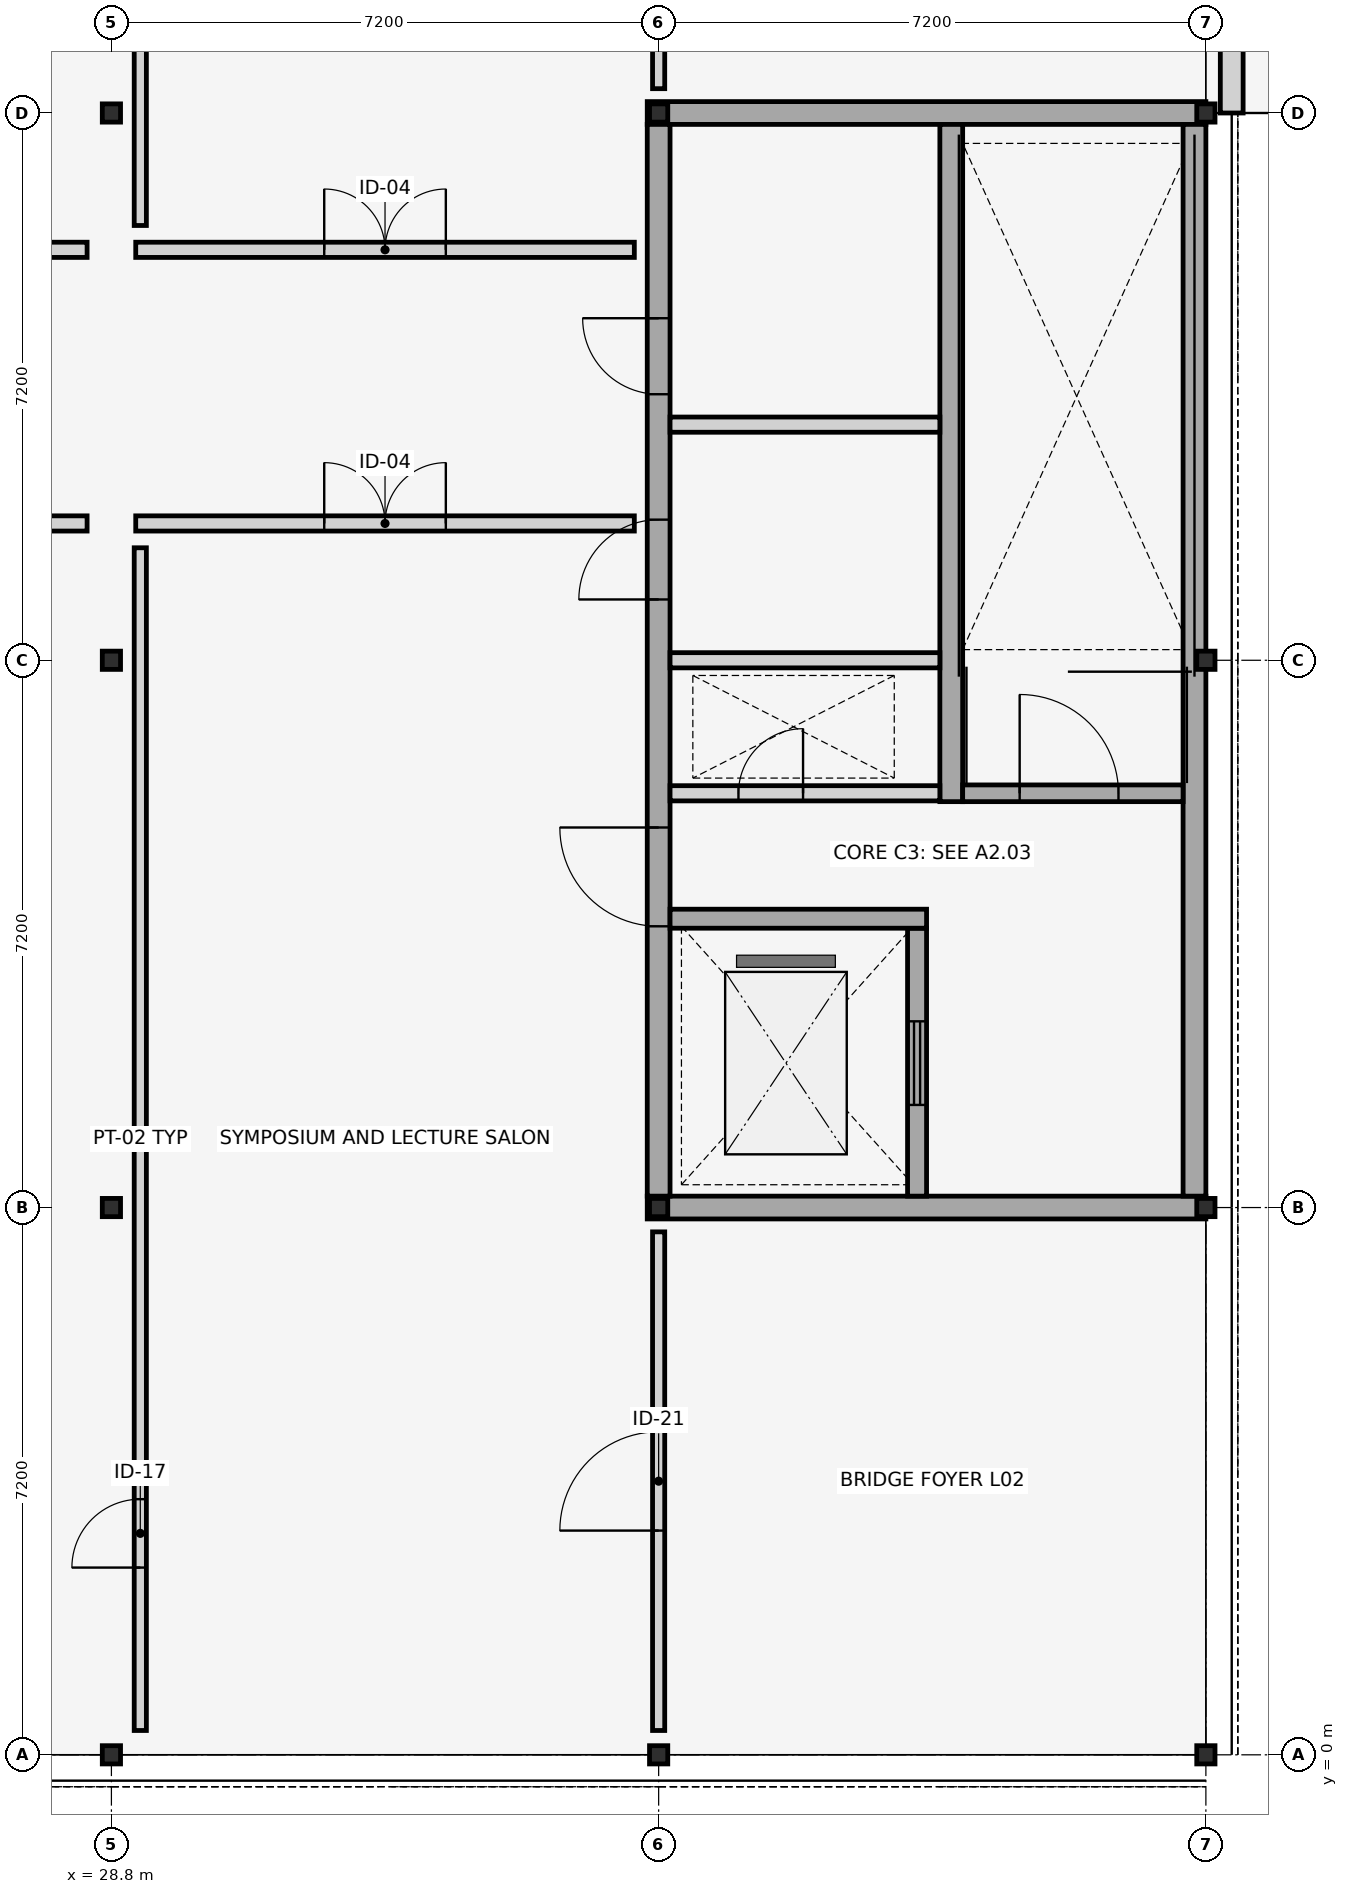
"""IFC4 building model, lengths in metres.
Left out: names, types, materials, properties, quantities, classifications, styles, units other than length and angle.
Written with IfcOpenShell. Run it as: python <this file> out.ifc"""

import sys

from ifc_helpers import new_model, si_unit, direction, frame, frame_2d, origin, origin_2d, place, context, subcontext, project, spatial, rectangle, i_section, extrude, element, fill, save


model = new_model("IFC4")
c1 = context("Model", 3, precision=1e-05, world=origin(), true_north=direction((0.0, 1.0)))
c2 = subcontext(c1, "Body", "Model", "MODEL_VIEW")
j1 = project(units=[si_unit("LENGTHUNIT", "METRE"), si_unit("PLANEANGLEUNIT", "RADIAN")], contexts=[c1])
p1 = place(None, origin())
s1 = spatial("IfcSite", under=j1, at=p1, CompositionType="ELEMENT")
p2 = place(p1, origin())
s2 = spatial("IfcBuilding", under=s1, at=p2, CompositionType="ELEMENT")
p3 = place(p2, frame((0.0, 0.0, 8.7)))
s3 = spatial("IfcBuildingStorey", under=s2, at=p3, CompositionType="ELEMENT", Elevation=8.7)
for number, where, z_axis, x_axis in (
    (1, (28.8, 0.0, 0.0), (0.0, 0.0, 1.0), (1.0, 0.0, 0.0)),
    (2, (28.8, 7.2, 0.0), (0.0, 0.0, 1.0), (0.0, 1.0, 0.0)),
    (3, (28.8, 14.4, 0.0), (0.0, 0.0, 1.0), (1.0, 0.0, 0.0)),
    (4, (28.8, 21.6, 0.0), (0.0, 0.0, 1.0), (0.0, 1.0, 0.0)),
    (5, (36.0, 0.0, 0.0), (0.0, 0.0, 1.0), (0.0, 1.0, 0.0)),
    (6, (36.0, 7.2, 0.0), (0.0, 0.0, 1.0), (1.0, 0.0, 0.0)),
    (7, (36.0, 21.6, 0.0), (0.0, 0.0, 1.0), (1.0, 0.0, 0.0)),
    (8, (43.2, 0.0, 0.0), (0.0, 0.0, 1.0), (1.0, 0.0, 0.0)),
    (9, (43.2, 7.2, 0.0), (0.0, 0.0, 1.0), (0.0, 1.0, 0.0)),
    (10, (43.2, 14.4, 0.0), (0.0, 0.0, 1.0), (1.0, 0.0, 0.0)),
    (11, (43.2, 21.6, 0.0), (0.0, 0.0, 1.0), (0.0, 1.0, 0.0)),
):
    element("IfcColumn", number, at=place(p3, frame(where, z_axis=z_axis, x_axis=x_axis)), inside=s3, PredefinedType="COLUMN", context=c2, shape_type="SweptSolid", body=[
        extrude(i_section(OverallWidth=0.24, OverallDepth=0.24, WebThickness=0.01, FlangeThickness=0.017, FilletRadius=0.021, at=origin_2d()), origin(), (0.0, 0.0, 1.0), 4.2),
    ])
p4 = place(p3, frame((43.54, 21.6, 0.0), z_axis=(0.0, 0.0, 1.0), x_axis=(0.0, 1.0, 0.0)))
e12 = element("IfcWall", 12, at=p4, inside=s3, PredefinedType="STANDARD", context=c2, shape_type="SweptSolid", body=[
    extrude(rectangle(XDim=7.68, YDim=0.3, at=frame_2d((3.84, 0.0))), origin(), (0.0, 0.0, 1.0), 3.65),
])
p5 = place(p4, frame((2.65, 0.0, 0.0)))
e13 = element("IfcOpeningElement", 13, at=p5, cuts=e12, PredefinedType="OPENING", context=c2, shape_type="SweptSolid", body=[
    extrude(rectangle(XDim=1.9, YDim=2.45, at=frame_2d((0.95, 1.225))), frame((0.0, 0.16, 0.0), z_axis=(0.0, -1.0, 0.0), x_axis=(1.0, 0.0, 0.0)), (0.0, 0.0, 1.0), 0.32),
])
for number, where, z_axis, x_axis in (
    (14, (35.85, 7.2, 0.0), (0.0, 0.0, 1.0), (1.0, 0.0, 0.0)),
    (15, (35.85, 21.6, 0.0), (0.0, 0.0, 1.0), (1.0, 0.0, 0.0)),
):
    element("IfcWall", number, at=place(p3, frame(where, z_axis=z_axis, x_axis=x_axis)), inside=s3, PredefinedType="SHEAR", context=c2, shape_type="SweptSolid", body=[
        extrude(rectangle(XDim=7.35, YDim=0.3, at=frame_2d((3.675, 0.0))), origin(), (0.0, 0.0, 1.0), 3.96),
    ])
p6 = place(p3, frame((43.05, 7.35, 0.0), z_axis=(0.0, 0.0, 1.0), x_axis=(0.0, 1.0, 0.0)))
e16 = element("IfcWall", 16, at=p6, inside=s3, PredefinedType="SHEAR", context=c2, shape_type="SweptSolid", body=[
    extrude(rectangle(XDim=14.1, YDim=0.3, at=frame_2d((7.05, 0.0))), origin(), (0.0, 0.0, 1.0), 3.96),
])
p7 = place(p3, frame((36.0, 7.35, 0.0), z_axis=(0.0, 0.0, 1.0), x_axis=(0.0, 1.0, 0.0)))
e17 = element("IfcWall", 17, at=p7, inside=s3, PredefinedType="SHEAR", context=c2, shape_type="SweptSolid", body=[
    extrude(rectangle(XDim=14.1, YDim=0.3, at=frame_2d((7.05, 0.0))), origin(), (0.0, 0.0, 1.0), 3.96),
])
p8 = place(p7, frame((3.55, 0.0, 0.0)))
e18 = element("IfcOpeningElement", 18, at=p8, cuts=e17, PredefinedType="OPENING", context=c2, shape_type="SweptSolid", body=[
    extrude(rectangle(XDim=1.3, YDim=2.2, at=frame_2d((0.65, 1.1))), frame((0.0, 0.16, 0.0), z_axis=(0.0, -1.0, 0.0), x_axis=(1.0, 0.0, 0.0)), (0.0, 0.0, 1.0), 0.32),
])
p9 = place(p7, frame((7.85, 0.0, 0.0)))
e19 = element("IfcOpeningElement", 19, at=p9, cuts=e17, PredefinedType="OPENING", context=c2, shape_type="SweptSolid", body=[
    extrude(rectangle(XDim=1.05, YDim=2.15, at=frame_2d((0.525, 1.075))), frame((0.0, 0.16, 0.0), z_axis=(0.0, -1.0, 0.0), x_axis=(1.0, 0.0, 0.0)), (0.0, 0.0, 1.0), 0.32),
])
p10 = place(p7, frame((10.55, 0.0, 0.0)))
e20 = element("IfcOpeningElement", 20, at=p10, cuts=e17, PredefinedType="OPENING", context=c2, shape_type="SweptSolid", body=[
    extrude(rectangle(XDim=1.0, YDim=2.15, at=frame_2d((0.5, 1.075))), frame((0.0, 0.16, 0.0), z_axis=(0.0, -1.0, 0.0), x_axis=(1.0, 0.0, 0.0)), (0.0, 0.0, 1.0), 0.32),
])
p11 = place(p3, frame((39.4, 7.35, 0.0), z_axis=(0.0, 0.0, 1.0), x_axis=(0.0, 1.0, 0.0)))
e21 = element("IfcWall", 21, at=p11, inside=s3, PredefinedType="SHEAR", context=c2, shape_type="SweptSolid", body=[
    extrude(rectangle(XDim=3.525, YDim=0.25, at=frame_2d((1.762, 0.0))), origin(), (0.0, 0.0, 1.0), 3.96),
])
p12 = place(p11, frame((1.2, 0.0, 0.0)))
e22 = element("IfcOpeningElement", 22, at=p12, cuts=e21, PredefinedType="OPENING", context=c2, shape_type="SweptSolid", body=[
    extrude(rectangle(XDim=1.1, YDim=2.15, at=frame_2d((0.55, 1.075))), frame((0.0, 0.135, 0.0), z_axis=(0.0, -1.0, 0.0), x_axis=(1.0, 0.0, 0.0)), (0.0, 0.0, 1.0), 0.27),
])
p13 = place(p3, frame((39.85, 12.54, 0.0), z_axis=(0.0, 0.0, 1.0), x_axis=(0.0, 1.0, 0.0)))
e23 = element("IfcWall", 23, at=p13, inside=s3, PredefinedType="SHEAR", context=c2, shape_type="SweptSolid", body=[
    extrude(rectangle(XDim=8.91, YDim=0.3, at=frame_2d((4.455, 0.0))), origin(), (0.0, 0.0, 1.0), 3.96),
])
p14 = place(p3, frame((36.15, 12.65, 0.0), z_axis=(0.0, 0.0, 1.0), x_axis=(1.0, 0.0, 0.0)))
e24 = element("IfcWall", 24, at=p14, inside=s3, PredefinedType="PLUMBINGWALL", context=c2, shape_type="SweptSolid", body=[
    extrude(rectangle(XDim=3.55, YDim=0.2, at=frame_2d((1.775, 0.0))), origin(), (0.0, 0.0, 1.0), 3.38),
])
p15 = place(p14, frame((0.9, 0.0, 0.0)))
e25 = element("IfcOpeningElement", 25, at=p15, cuts=e24, PredefinedType="OPENING", context=c2, shape_type="SweptSolid", body=[
    extrude(rectangle(XDim=0.85, YDim=2.05, at=frame_2d((0.425, 1.025))), frame((0.0, 0.11, 0.0), z_axis=(0.0, -1.0, 0.0), x_axis=(1.0, 0.0, 0.0)), (0.0, 0.0, 1.0), 0.22),
])
p16 = place(p3, frame((40.0, 12.65, 0.0), z_axis=(0.0, 0.0, 1.0), x_axis=(1.0, 0.0, 0.0)))
e26 = element("IfcWall", 26, at=p16, inside=s3, PredefinedType="SHEAR", context=c2, shape_type="SweptSolid", body=[
    extrude(rectangle(XDim=2.9, YDim=0.22, at=frame_2d((1.45, 0.0))), origin(), (0.0, 0.0, 1.0), 3.96),
])
p17 = place(p16, frame((0.75, 0.0, 0.0)))
e27 = element("IfcOpeningElement", 27, at=p17, cuts=e26, PredefinedType="OPENING", context=c2, shape_type="SweptSolid", body=[
    extrude(rectangle(XDim=1.3, YDim=2.2, at=frame_2d((0.65, 1.1))), frame((0.0, 0.12, 0.0), z_axis=(0.0, -1.0, 0.0), x_axis=(1.0, 0.0, 0.0)), (0.0, 0.0, 1.0), 0.24),
])
p18 = place(p3, frame((36.15, 11.0, 0.0), z_axis=(0.0, 0.0, 1.0), x_axis=(1.0, 0.0, 0.0)))
e28 = element("IfcWall", 28, at=p18, inside=s3, PredefinedType="SHEAR", context=c2, shape_type="SweptSolid", body=[
    extrude(rectangle(XDim=3.375, YDim=0.25, at=frame_2d((1.688, 0.0))), origin(), (0.0, 0.0, 1.0), 3.96),
])
for number, where, z_axis, x_axis in (
    (29, (36.15, 14.4, 0.0), (0.0, 0.0, 1.0), (1.0, 0.0, 0.0)),
    (30, (36.15, 17.5, 0.0), (0.0, 0.0, 1.0), (1.0, 0.0, 0.0)),
):
    element("IfcWall", number, at=place(p3, frame(where, z_axis=z_axis, x_axis=x_axis)), inside=s3, PredefinedType="PLUMBINGWALL", context=c2, shape_type="SweptSolid", body=[
        extrude(rectangle(XDim=3.55, YDim=0.2, at=frame_2d((1.775, 0.0))), origin(), (0.0, 0.0, 1.0), 3.38),
    ])
p19 = place(p3, frame((7.52, 16.2, 0.0), z_axis=(0.0, 0.0, 1.0), x_axis=(1.0, 0.0, 0.0)))
e31 = element("IfcWall", 31, at=p19, inside=s3, PredefinedType="PARTITIONING", context=c2, shape_type="SweptSolid", body=[
    extrude(rectangle(XDim=20.96, YDim=0.2, at=frame_2d((10.48, 0.0))), origin(), (0.0, 0.0, 1.0), 3.15),
])
p20 = place(p19, frame((9.68, 0.0, 0.0)))
e32 = element("IfcOpeningElement", 32, at=p20, cuts=e31, PredefinedType="OPENING", context=c2, shape_type="SweptSolid", body=[
    extrude(rectangle(XDim=1.6, YDim=2.35, at=frame_2d((0.8, 1.175))), frame((0.0, 0.11, 0.0), z_axis=(0.0, -1.0, 0.0), x_axis=(1.0, 0.0, 0.0)), (0.0, 0.0, 1.0), 0.22),
])
p21 = place(p3, frame((7.52, 19.8, 0.0), z_axis=(0.0, 0.0, 1.0), x_axis=(1.0, 0.0, 0.0)))
e33 = element("IfcWall", 33, at=p21, inside=s3, PredefinedType="PARTITIONING", context=c2, shape_type="SweptSolid", body=[
    extrude(rectangle(XDim=20.96, YDim=0.2, at=frame_2d((10.48, 0.0))), origin(), (0.0, 0.0, 1.0), 3.15),
])
p22 = place(p21, frame((9.73, 0.0, 0.0)))
e34 = element("IfcOpeningElement", 34, at=p22, cuts=e33, PredefinedType="OPENING", context=c2, shape_type="SweptSolid", body=[
    extrude(rectangle(XDim=1.5, YDim=2.25, at=frame_2d((0.75, 1.125))), frame((0.0, 0.11, 0.0), z_axis=(0.0, -1.0, 0.0), x_axis=(1.0, 0.0, 0.0)), (0.0, 0.0, 1.0), 0.22),
])
p23 = place(p3, frame((29.12, 16.2, 0.0), z_axis=(0.0, 0.0, 1.0), x_axis=(1.0, 0.0, 0.0)))
e35 = element("IfcWall", 35, at=p23, inside=s3, PredefinedType="PARTITIONING", context=c2, shape_type="SweptSolid", body=[
    extrude(rectangle(XDim=6.56, YDim=0.2, at=frame_2d((3.28, 0.0))), origin(), (0.0, 0.0, 1.0), 3.15),
])
p24 = place(p23, frame((2.48, 0.0, 0.0)))
e36 = element("IfcOpeningElement", 36, at=p24, cuts=e35, PredefinedType="OPENING", context=c2, shape_type="SweptSolid", body=[
    extrude(rectangle(XDim=1.6, YDim=2.35, at=frame_2d((0.8, 1.175))), frame((0.0, 0.11, 0.0), z_axis=(0.0, -1.0, 0.0), x_axis=(1.0, 0.0, 0.0)), (0.0, 0.0, 1.0), 0.22),
])
p25 = place(p3, frame((29.12, 19.8, 0.0), z_axis=(0.0, 0.0, 1.0), x_axis=(1.0, 0.0, 0.0)))
e37 = element("IfcWall", 37, at=p25, inside=s3, PredefinedType="PARTITIONING", context=c2, shape_type="SweptSolid", body=[
    extrude(rectangle(XDim=6.56, YDim=0.2, at=frame_2d((3.28, 0.0))), origin(), (0.0, 0.0, 1.0), 3.15),
])
p26 = place(p25, frame((2.48, 0.0, 0.0)))
e38 = element("IfcOpeningElement", 38, at=p26, cuts=e37, PredefinedType="OPENING", context=c2, shape_type="SweptSolid", body=[
    extrude(rectangle(XDim=1.6, YDim=2.35, at=frame_2d((0.8, 1.175))), frame((0.0, 0.11, 0.0), z_axis=(0.0, -1.0, 0.0), x_axis=(1.0, 0.0, 0.0)), (0.0, 0.0, 1.0), 0.22),
])
p27 = place(p3, frame((29.18, 0.32, 0.0), z_axis=(0.0, 0.0, 1.0), x_axis=(0.0, 1.0, 0.0)))
e39 = element("IfcWall", 39, at=p27, inside=s3, PredefinedType="PARTITIONING", context=c2, shape_type="SweptSolid", body=[
    extrude(rectangle(XDim=15.56, YDim=0.16, at=frame_2d((7.78, 0.0))), origin(), (0.0, 0.0, 1.0), 3.15),
])
p28 = place(p27, frame((2.143, 0.0, 0.0)))
e40 = element("IfcOpeningElement", 40, at=p28, cuts=e39, PredefinedType="OPENING", context=c2, shape_type="SweptSolid", body=[
    extrude(rectangle(XDim=0.9, YDim=2.1, at=frame_2d((0.45, 1.05))), frame((0.0, 0.09, 0.0), z_axis=(0.0, -1.0, 0.0), x_axis=(1.0, 0.0, 0.0)), (0.0, 0.0, 1.0), 0.18),
])
p29 = place(p3, frame((29.18, 20.12, 0.0), z_axis=(0.0, 0.0, 1.0), x_axis=(0.0, 1.0, 0.0)))
e41 = element("IfcWall", 41, at=p29, inside=s3, PredefinedType="PARTITIONING", context=c2, shape_type="SweptSolid", body=[
    extrude(rectangle(XDim=8.36, YDim=0.16, at=frame_2d((4.18, 0.0))), origin(), (0.0, 0.0, 1.0), 3.15),
])
p30 = place(p29, frame((3.63, 0.0, 0.0)))
e42 = element("IfcOpeningElement", 42, at=p30, cuts=e41, PredefinedType="OPENING", context=c2, shape_type="SweptSolid", body=[
    extrude(rectangle(XDim=1.1, YDim=2.35, at=frame_2d((0.55, 1.175))), frame((0.0, 0.09, 0.0), z_axis=(0.0, -1.0, 0.0), x_axis=(1.0, 0.0, 0.0)), (0.0, 0.0, 1.0), 0.18),
])
p31 = place(p3, frame((36.0, 0.32, 0.0), z_axis=(0.0, 0.0, 1.0), x_axis=(0.0, 1.0, 0.0)))
e43 = element("IfcWall", 43, at=p31, inside=s3, PredefinedType="PARTITIONING", context=c2, shape_type="SweptSolid", body=[
    extrude(rectangle(XDim=6.56, YDim=0.16, at=frame_2d((3.28, 0.0))), origin(), (0.0, 0.0, 1.0), 3.15),
])
p32 = place(p31, frame((2.63, 0.0, 0.0)))
e44 = element("IfcOpeningElement", 44, at=p32, cuts=e43, PredefinedType="OPENING", context=c2, shape_type="SweptSolid", body=[
    extrude(rectangle(XDim=1.3, YDim=2.45, at=frame_2d((0.65, 1.225))), frame((0.0, 0.09, 0.0), z_axis=(0.0, -1.0, 0.0), x_axis=(1.0, 0.0, 0.0)), (0.0, 0.0, 1.0), 0.18),
])
p33 = place(p3, frame((36.0, 21.92, 0.0), z_axis=(0.0, 0.0, 1.0), x_axis=(0.0, 1.0, 0.0)))
e45 = element("IfcWall", 45, at=p33, inside=s3, PredefinedType="PARTITIONING", context=c2, shape_type="SweptSolid", body=[
    extrude(rectangle(XDim=6.56, YDim=0.16, at=frame_2d((3.28, 0.0))), origin(), (0.0, 0.0, 1.0), 3.15),
])
p34 = place(p33, frame((2.555, 0.0, 0.0)))
e46 = element("IfcOpeningElement", 46, at=p34, cuts=e45, PredefinedType="OPENING", context=c2, shape_type="SweptSolid", body=[
    extrude(rectangle(XDim=1.45, YDim=2.35, at=frame_2d((0.725, 1.175))), frame((0.0, 0.09, 0.0), z_axis=(0.0, -1.0, 0.0), x_axis=(1.0, 0.0, 0.0)), (0.0, 0.0, 1.0), 0.18),
])
p35 = place(p8, origin())
e47 = element("IfcDoor", 47, at=p35, inside=s3, OperationType="SINGLE_SWING_RIGHT", PredefinedType="DOOR", context=c2, shape_type="SweptSolid", body=[
    extrude(rectangle(XDim=1.3, YDim=2.2, at=frame_2d((0.65, 1.1))), frame((0.0, 0.025, 0.0), z_axis=(0.0, -1.0, 0.0), x_axis=(1.0, 0.0, 0.0)), (0.0, 0.0, 1.0), 0.05),
])
fill(e18, e47)
p36 = place(p9, origin())
e48 = element("IfcDoor", 48, at=p36, inside=s3, OperationType="SINGLE_SWING_LEFT", PredefinedType="DOOR", context=c2, shape_type="SweptSolid", body=[
    extrude(rectangle(XDim=1.05, YDim=2.15, at=frame_2d((0.525, 1.075))), frame((0.0, 0.025, 0.0), z_axis=(0.0, -1.0, 0.0), x_axis=(1.0, 0.0, 0.0)), (0.0, 0.0, 1.0), 0.05),
])
fill(e19, e48)
p37 = place(p10, origin())
e49 = element("IfcDoor", 49, at=p37, inside=s3, OperationType="SINGLE_SWING_RIGHT", PredefinedType="DOOR", context=c2, shape_type="SweptSolid", body=[
    extrude(rectangle(XDim=1.0, YDim=2.15, at=frame_2d((0.5, 1.075))), frame((0.0, 0.025, 0.0), z_axis=(0.0, -1.0, 0.0), x_axis=(1.0, 0.0, 0.0)), (0.0, 0.0, 1.0), 0.05),
])
fill(e20, e49)
p38 = place(p12, origin())
e50 = element("IfcDoor", 50, at=p38, inside=s3, OperationType="SLIDING_TO_LEFT", PredefinedType="DOOR", context=c2, shape_type="SweptSolid", body=[
    extrude(rectangle(XDim=1.1, YDim=2.15, at=frame_2d((0.55, 1.075))), frame((0.0, 0.025, 0.0), z_axis=(0.0, -1.0, 0.0), x_axis=(1.0, 0.0, 0.0)), (0.0, 0.0, 1.0), 0.05),
])
fill(e22, e50)
p39 = place(p15, origin())
e51 = element("IfcDoor", 51, at=p39, inside=s3, OperationType="SINGLE_SWING_RIGHT", PredefinedType="TRAPDOOR", context=c2, shape_type="SweptSolid", body=[
    extrude(rectangle(XDim=0.85, YDim=2.05, at=frame_2d((0.425, 1.025))), frame((0.0, 0.025, 0.0), z_axis=(0.0, -1.0, 0.0), x_axis=(1.0, 0.0, 0.0)), (0.0, 0.0, 1.0), 0.05),
])
fill(e25, e51)
p40 = place(p17, origin())
e52 = element("IfcDoor", 52, at=p40, inside=s3, OperationType="SINGLE_SWING_LEFT", PredefinedType="DOOR", context=c2, shape_type="SweptSolid", body=[
    extrude(rectangle(XDim=1.3, YDim=2.2, at=frame_2d((0.65, 1.1))), frame((0.0, 0.025, 0.0), z_axis=(0.0, -1.0, 0.0), x_axis=(1.0, 0.0, 0.0)), (0.0, 0.0, 1.0), 0.05),
])
fill(e27, e52)
p41 = place(p24, origin())
e53 = element("IfcDoor", 53, at=p41, inside=s3, OperationType="DOUBLE_DOOR_SINGLE_SWING", PredefinedType="DOOR", context=c2, shape_type="SweptSolid", body=[
    extrude(rectangle(XDim=1.6, YDim=2.35, at=frame_2d((0.8, 1.175))), frame((0.0, 0.025, 0.0), z_axis=(0.0, -1.0, 0.0), x_axis=(1.0, 0.0, 0.0)), (0.0, 0.0, 1.0), 0.05),
])
fill(e36, e53)
p42 = place(p26, origin())
e54 = element("IfcDoor", 54, at=p42, inside=s3, OperationType="DOUBLE_DOOR_SINGLE_SWING", PredefinedType="DOOR", context=c2, shape_type="SweptSolid", body=[
    extrude(rectangle(XDim=1.6, YDim=2.35, at=frame_2d((0.8, 1.175))), frame((0.0, 0.025, 0.0), z_axis=(0.0, -1.0, 0.0), x_axis=(1.0, 0.0, 0.0)), (0.0, 0.0, 1.0), 0.05),
])
fill(e38, e54)
p43 = place(p28, origin())
e55 = element("IfcDoor", 55, at=p43, inside=s3, OperationType="SINGLE_SWING_LEFT", PredefinedType="DOOR", context=c2, shape_type="SweptSolid", body=[
    extrude(rectangle(XDim=0.9, YDim=2.1, at=frame_2d((0.45, 1.05))), frame((0.0, 0.025, 0.0), z_axis=(0.0, -1.0, 0.0), x_axis=(1.0, 0.0, 0.0)), (0.0, 0.0, 1.0), 0.05),
])
fill(e40, e55)
p44 = place(p32, origin())
e56 = element("IfcDoor", 56, at=p44, inside=s3, OperationType="SINGLE_SWING_LEFT", PredefinedType="DOOR", context=c2, shape_type="SweptSolid", body=[
    extrude(rectangle(XDim=1.3, YDim=2.45, at=frame_2d((0.65, 1.225))), frame((0.0, 0.025, 0.0), z_axis=(0.0, -1.0, 0.0), x_axis=(1.0, 0.0, 0.0)), (0.0, 0.0, 1.0), 0.05),
])
fill(e44, e56)
save(model, sys.argv[1])
